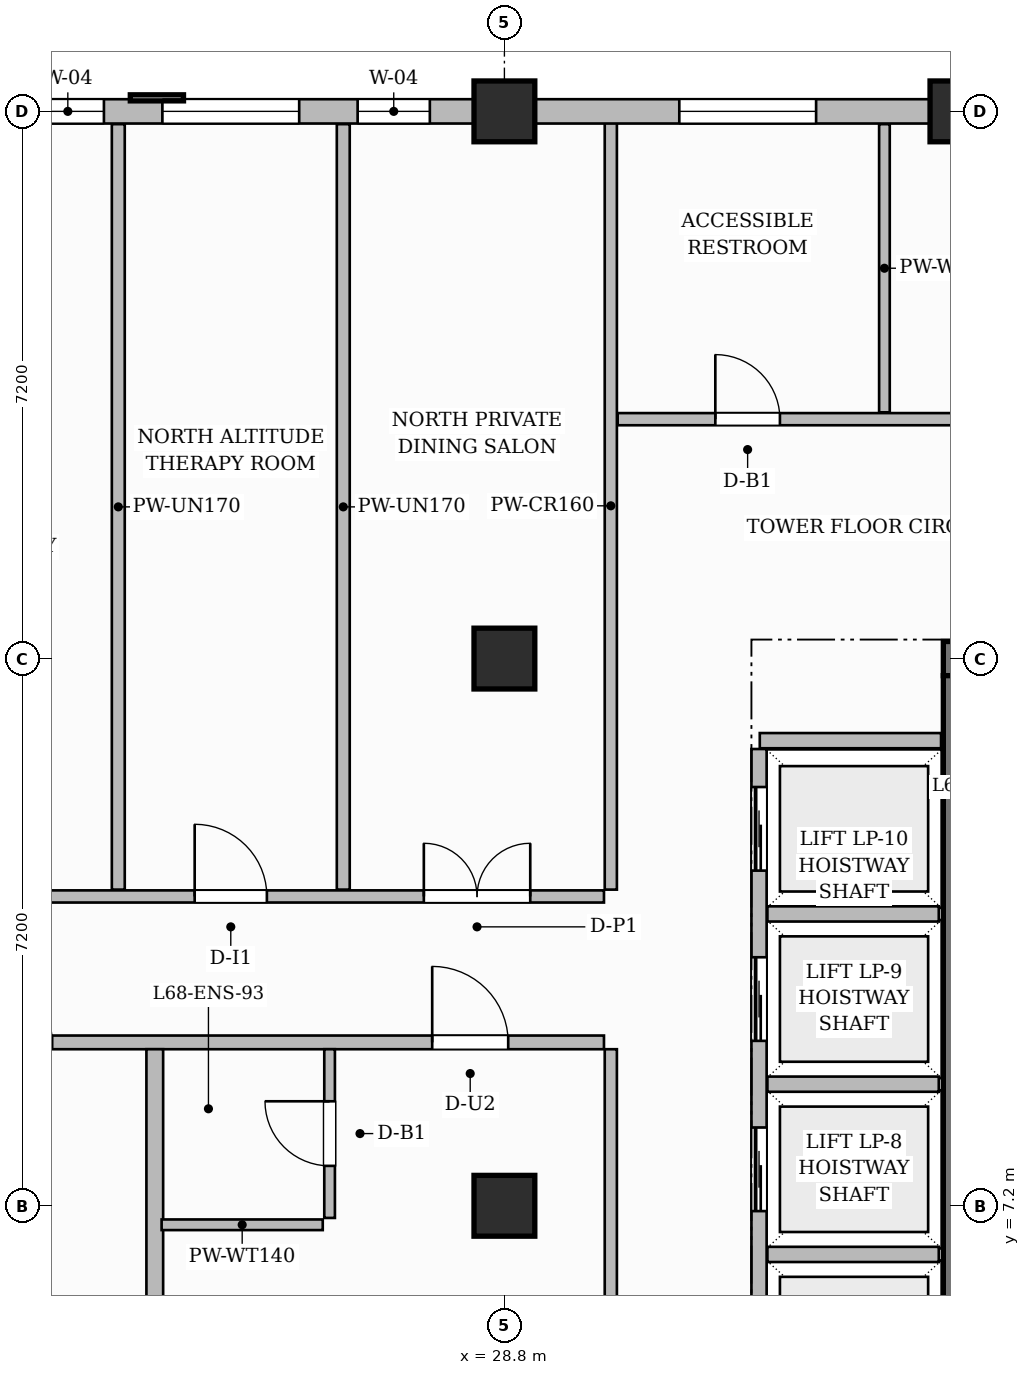
"""IFC4 building model, lengths in metres.
Left out: names, types, materials, properties, quantities, classifications, styles, units other than length and angle.
Written with IfcOpenShell. Run it as: python <this file> out.ifc"""

import sys

from ifc_helpers import new_model, si_unit, direction, frame, frame_2d, origin, origin_2d, place, context, subcontext, project, spatial, rectangle, extrude, source, transform, mapped, element, fill, save


model = new_model("IFC4")
c1 = context("Model", 3, precision=1e-05, world=origin(), true_north=direction((0.0, 1.0)))
c2 = subcontext(c1, "Body", "Model", "MODEL_VIEW")
j1 = project(units=[si_unit("LENGTHUNIT", "METRE"), si_unit("PLANEANGLEUNIT", "RADIAN")], contexts=[c1])
p1 = place(None, origin())
s1 = spatial("IfcSite", under=j1, at=p1, CompositionType="ELEMENT")
p2 = place(p1, origin())
s2 = spatial("IfcBuilding", under=s1, at=p2, CompositionType="ELEMENT")
p3 = place(p2, frame((0.0, 0.0, 271.2)))
s3 = spatial("IfcBuildingStorey", under=s2, at=p3, CompositionType="ELEMENT", Elevation=271.2)
p4 = place(p3, frame((34.575, 14.4, 0.0), z_axis=(0.0, 0.0, 1.0), x_axis=(1.0, 0.0, 0.0)))
e1 = element("IfcWall", 1, at=p4, inside=s3, PredefinedType="SHEAR", context=c2, shape_type="SweptSolid", body=[
    extrude(rectangle(XDim=15.45, YDim=0.45, at=frame_2d((7.725, 0.0))), origin(), (0.0, 0.0, 1.0), 3.85),
])
p5 = place(p4, frame((5.355, 0.0, 0.0)))
e2 = element("IfcOpeningElement", 2, at=p5, cuts=e1, PredefinedType="OPENING", context=c2, shape_type="SweptSolid", body=[
    extrude(rectangle(XDim=1.5, YDim=2.2, at=frame_2d((0.75, 1.1))), frame((0.0, 0.235, 0.0), z_axis=(0.0, -1.0, 0.0), x_axis=(1.0, 0.0, 0.0)), (0.0, 0.0, 1.0), 0.47),
])
p6 = place(p4, frame((1.57, 0.0, 0.0)))
e3 = element("IfcOpeningElement", 3, at=p6, cuts=e1, PredefinedType="OPENING", context=c2, shape_type="SweptSolid", body=[
    extrude(rectangle(XDim=1.05, YDim=2.15, at=frame_2d((0.525, 1.075))), frame((0.0, 0.235, 0.0), z_axis=(0.0, -1.0, 0.0), x_axis=(1.0, 0.0, 0.0)), (0.0, 0.0, 1.0), 0.47),
])
p7 = place(p4, frame((11.2, 0.0, 0.0)))
e4 = element("IfcOpeningElement", 4, at=p7, cuts=e1, PredefinedType="OPENING", context=c2, shape_type="SweptSolid", body=[
    extrude(rectangle(XDim=1.05, YDim=2.15, at=frame_2d((0.525, 1.075))), frame((0.0, 0.235, 0.0), z_axis=(0.0, -1.0, 0.0), x_axis=(1.0, 0.0, 0.0)), (0.0, 0.0, 1.0), 0.47),
])
p8 = place(p3, frame((34.8, 3.825, 0.0), z_axis=(0.0, 0.0, 1.0), x_axis=(0.0, 1.0, 0.0)))
e5 = element("IfcWall", 5, at=p8, inside=s3, PredefinedType="SHEAR", context=c2, shape_type="SweptSolid", body=[
    extrude(rectangle(XDim=10.35, YDim=0.45, at=frame_2d((5.175, 0.0))), origin(), (0.0, 0.0, 1.0), 3.85),
])
m1 = source(origin(), c2, "Body", "SweptSolid", [
    extrude(rectangle(XDim=0.8, YDim=0.8, at=origin_2d()), origin(), (0.0, 0.0, 1.0), 3.85),
])
for number, where, z_axis, x_axis in (
    (6, (28.8, 7.2, 0.0), (0.0, 0.0, 1.0), (1.0, 0.0, 0.0)),
    (7, (28.8, 14.4, 0.0), (0.0, 0.0, 1.0), (1.0, 0.0, 0.0)),
    (8, (28.8, 21.6, 0.0), (0.0, 0.0, 1.0), (1.0, 0.0, 0.0)),
    (9, (34.8, 21.6, 0.0), (0.0, 0.0, 1.0), (1.0, 0.0, 0.0)),
):
    element("IfcColumn", number, at=place(p3, frame(where, z_axis=z_axis, x_axis=x_axis)), inside=s3, PredefinedType="COLUMN", context=c2, shape_type="MappedRepresentation", body=[
        mapped(m1, transform((0.0, 0.0, 0.0), scale=1.0)),
    ])
p9 = place(p3, frame((32.16, 13.32, 0.0), z_axis=(0.0, 0.0, 1.0), x_axis=(1.0, 0.0, 0.0)))
e10 = element("IfcWall", 10, at=p9, inside=s3, PredefinedType="PARTITIONING", context=c2, shape_type="SweptSolid", body=[
    extrude(rectangle(XDim=2.385, YDim=0.2, at=frame_2d((1.192, 0.0))), origin(), (0.0, 0.0, 1.0), 3.6),
])
p10 = place(p3, frame((32.15, 4.39, 0.0), z_axis=(0.0, 0.0, 1.0), x_axis=(0.0, 1.0, 0.0)))
e11 = element("IfcWall", 11, at=p10, inside=s3, PredefinedType="PARTITIONING", context=c2, shape_type="SweptSolid", body=[
    extrude(rectangle(XDim=8.82, YDim=0.2, at=frame_2d((4.41, 0.0))), origin(), (0.0, 0.0, 1.0), 3.6),
])
p11 = place(p10, frame((0.5, 0.0, 0.0)))
e12 = element("IfcOpeningElement", 12, at=p11, cuts=e11, PredefinedType="OPENING", context=c2, shape_type="SweptSolid", body=[
    extrude(rectangle(XDim=1.1, YDim=2.2, at=frame_2d((0.55, 1.1))), frame((0.0, 0.11, 0.0), z_axis=(0.0, -1.0, 0.0), x_axis=(1.0, 0.0, 0.0)), (0.0, 0.0, 1.0), 0.22),
])
p12 = place(p10, frame((2.74, 0.0, 0.0)))
e13 = element("IfcOpeningElement", 13, at=p12, cuts=e11, PredefinedType="OPENING", context=c2, shape_type="SweptSolid", body=[
    extrude(rectangle(XDim=1.1, YDim=2.2, at=frame_2d((0.55, 1.1))), frame((0.0, 0.11, 0.0), z_axis=(0.0, -1.0, 0.0), x_axis=(1.0, 0.0, 0.0)), (0.0, 0.0, 1.0), 0.22),
])
p13 = place(p10, frame((4.98, 0.0, 0.0)))
e14 = element("IfcOpeningElement", 14, at=p13, cuts=e11, PredefinedType="OPENING", context=c2, shape_type="SweptSolid", body=[
    extrude(rectangle(XDim=1.1, YDim=2.2, at=frame_2d((0.55, 1.1))), frame((0.0, 0.11, 0.0), z_axis=(0.0, -1.0, 0.0), x_axis=(1.0, 0.0, 0.0)), (0.0, 0.0, 1.0), 0.22),
])
p14 = place(p10, frame((7.22, 0.0, 0.0)))
e15 = element("IfcOpeningElement", 15, at=p14, cuts=e11, PredefinedType="OPENING", context=c2, shape_type="SweptSolid", body=[
    extrude(rectangle(XDim=1.1, YDim=2.2, at=frame_2d((0.55, 1.1))), frame((0.0, 0.11, 0.0), z_axis=(0.0, -1.0, 0.0), x_axis=(1.0, 0.0, 0.0)), (0.0, 0.0, 1.0), 0.22),
])
for number, where, z_axis, x_axis in (
    (16, (32.26, 6.56, 0.0), (0.0, 0.0, 1.0), (1.0, 0.0, 0.0)),
    (17, (32.26, 8.8, 0.0), (0.0, 0.0, 1.0), (1.0, 0.0, 0.0)),
    (18, (32.26, 11.04, 0.0), (0.0, 0.0, 1.0), (1.0, 0.0, 0.0)),
):
    element("IfcWall", number, at=place(p3, frame(where, z_axis=z_axis, x_axis=x_axis)), inside=s3, PredefinedType="PARTITIONING", context=c2, shape_type="SweptSolid", body=[
        extrude(rectangle(XDim=2.255, YDim=0.2, at=frame_2d((1.127, 0.0))), origin(), (0.0, 0.0, 1.0), 3.6),
    ])
p15 = place(p3, frame((18.168, 9.35, 0.0), z_axis=(0.0, 0.0, 1.0), x_axis=(1.0, 0.0, 0.0)))
e19 = element("IfcWall", 19, at=p15, inside=s3, PredefinedType="PARTITIONING", context=c2, shape_type="SweptSolid", body=[
    extrude(rectangle(XDim=11.942, YDim=0.18, at=frame_2d((5.971, 0.0))), origin(), (0.0, 0.0, 1.0), 3.6),
])
p16 = place(p15, frame((3.632, 0.0, 0.0)))
e20 = element("IfcOpeningElement", 20, at=p16, cuts=e19, PredefinedType="OPENING", context=c2, shape_type="SweptSolid", body=[
    extrude(rectangle(XDim=1.05, YDim=2.25, at=frame_2d((0.525, 1.125))), frame((0.0, 0.1, 0.0), z_axis=(0.0, -1.0, 0.0), x_axis=(1.0, 0.0, 0.0)), (0.0, 0.0, 1.0), 0.2),
])
p17 = place(p15, frame((9.682, 0.0, 0.0)))
e21 = element("IfcOpeningElement", 21, at=p17, cuts=e19, PredefinedType="OPENING", context=c2, shape_type="SweptSolid", body=[
    extrude(rectangle(XDim=1.0, YDim=2.2, at=frame_2d((0.5, 1.1))), frame((0.0, 0.1, 0.0), z_axis=(0.0, -1.0, 0.0), x_axis=(1.0, 0.0, 0.0)), (0.0, 0.0, 1.0), 0.2),
])
p18 = place(p3, frame((18.168, 11.27, 0.0), z_axis=(0.0, 0.0, 1.0), x_axis=(1.0, 0.0, 0.0)))
e22 = element("IfcWall", 22, at=p18, inside=s3, PredefinedType="PARTITIONING", context=c2, shape_type="SweptSolid", body=[
    extrude(rectangle(XDim=11.942, YDim=0.16, at=frame_2d((5.971, 0.0))), origin(), (0.0, 0.0, 1.0), 3.6),
])
p19 = place(p18, frame((2.217, 0.0, 0.0)))
e23 = element("IfcOpeningElement", 23, at=p19, cuts=e22, PredefinedType="OPENING", context=c2, shape_type="SweptSolid", body=[
    extrude(rectangle(XDim=0.95, YDim=2.15, at=frame_2d((0.475, 1.075))), frame((0.0, 0.09, 0.0), z_axis=(0.0, -1.0, 0.0), x_axis=(1.0, 0.0, 0.0)), (0.0, 0.0, 1.0), 0.18),
])
p20 = place(p18, frame((6.557, 0.0, 0.0)))
e24 = element("IfcOpeningElement", 24, at=p20, cuts=e22, PredefinedType="OPENING", context=c2, shape_type="SweptSolid", body=[
    extrude(rectangle(XDim=0.95, YDim=2.15, at=frame_2d((0.475, 1.075))), frame((0.0, 0.09, 0.0), z_axis=(0.0, -1.0, 0.0), x_axis=(1.0, 0.0, 0.0)), (0.0, 0.0, 1.0), 0.18),
])
p21 = place(p18, frame((9.572, 0.0, 0.0)))
e25 = element("IfcOpeningElement", 25, at=p21, cuts=e22, PredefinedType="OPENING", context=c2, shape_type="SweptSolid", body=[
    extrude(rectangle(XDim=1.4, YDim=2.35, at=frame_2d((0.7, 1.175))), frame((0.0, 0.09, 0.0), z_axis=(0.0, -1.0, 0.0), x_axis=(1.0, 0.0, 0.0)), (0.0, 0.0, 1.0), 0.18),
])
p22 = place(p3, frame((30.2, 11.36, 0.0), z_axis=(0.0, 0.0, 1.0), x_axis=(0.0, 1.0, 0.0)))
e26 = element("IfcWall", 26, at=p22, inside=s3, PredefinedType="PARTITIONING", context=c2, shape_type="SweptSolid", body=[
    extrude(rectangle(XDim=10.1, YDim=0.16, at=frame_2d((5.05, 0.0))), origin(), (0.0, 0.0, 1.0), 3.6),
])
p23 = place(p3, frame((30.29, 17.55, 0.0), z_axis=(0.0, 0.0, 1.0), x_axis=(1.0, 0.0, 0.0)))
e27 = element("IfcWall", 27, at=p23, inside=s3, PredefinedType="PARTITIONING", context=c2, shape_type="SweptSolid", body=[
    extrude(rectangle(XDim=19.37, YDim=0.16, at=frame_2d((9.685, 0.0))), origin(), (0.0, 0.0, 1.0), 3.6),
])
p24 = place(p23, frame((1.285, 0.0, 0.0)))
e28 = element("IfcOpeningElement", 28, at=p24, cuts=e27, PredefinedType="OPENING", context=c2, shape_type="SweptSolid", body=[
    extrude(rectangle(XDim=0.85, YDim=2.1, at=frame_2d((0.425, 1.05))), frame((0.0, 0.09, 0.0), z_axis=(0.0, -1.0, 0.0), x_axis=(1.0, 0.0, 0.0)), (0.0, 0.0, 1.0), 0.18),
])
p25 = place(p23, frame((10.66, 0.0, 0.0)))
e29 = element("IfcOpeningElement", 29, at=p25, cuts=e27, PredefinedType="OPENING", context=c2, shape_type="SweptSolid", body=[
    extrude(rectangle(XDim=1.6, YDim=2.4, at=frame_2d((0.8, 1.2))), frame((0.0, 0.09, 0.0), z_axis=(0.0, -1.0, 0.0), x_axis=(1.0, 0.0, 0.0)), (0.0, 0.0, 1.0), 0.18),
])
p26 = place(p3, frame((30.2, 0.168, 0.0), z_axis=(0.0, 0.0, 1.0), x_axis=(0.0, 1.0, 0.0)))
e30 = element("IfcWall", 30, at=p26, inside=s3, PredefinedType="PARTITIONING", context=c2, shape_type="SweptSolid", body=[
    extrude(rectangle(XDim=9.092, YDim=0.16, at=frame_2d((4.546, 0.0))), origin(), (0.0, 0.0, 1.0), 3.6),
])
p27 = place(p26, frame((1.957, 0.0, 0.0)))
e31 = element("IfcOpeningElement", 31, at=p27, cuts=e30, PredefinedType="OPENING", context=c2, shape_type="SweptSolid", body=[
    extrude(rectangle(XDim=1.05, YDim=2.15, at=frame_2d((0.525, 1.075))), frame((0.0, 0.09, 0.0), z_axis=(0.0, -1.0, 0.0), x_axis=(1.0, 0.0, 0.0)), (0.0, 0.0, 1.0), 0.18),
])
p28 = place(p3, frame((33.8, 17.64, 0.0), z_axis=(0.0, 0.0, 1.0), x_axis=(0.0, 1.0, 0.0)))
e32 = element("IfcWall", 32, at=p28, inside=s3, PredefinedType="PARTITIONING", context=c2, shape_type="SweptSolid", body=[
    extrude(rectangle(XDim=3.792, YDim=0.14, at=frame_2d((1.896, 0.0))), origin(), (0.0, 0.0, 1.0), 3.6),
])
p29 = place(p3, frame((24.2, 0.168, 0.0), z_axis=(0.0, 0.0, 1.0), x_axis=(0.0, 1.0, 0.0)))
e33 = element("IfcWall", 33, at=p29, inside=s3, PredefinedType="PARTITIONING", context=c2, shape_type="SweptSolid", body=[
    extrude(rectangle(XDim=9.092, YDim=0.22, at=frame_2d((4.546, 0.0))), origin(), (0.0, 0.0, 1.0), 3.6),
])
p30 = place(p3, frame((26.5, 7.04, 0.0), z_axis=(0.0, 0.0, 1.0), x_axis=(0.0, 1.0, 0.0)))
e34 = element("IfcWall", 34, at=p30, inside=s3, PredefinedType="PARTITIONING", context=c2, shape_type="SweptSolid", body=[
    extrude(rectangle(XDim=2.22, YDim=0.14, at=frame_2d((1.11, 0.0))), origin(), (0.0, 0.0, 1.0), 3.6),
])
p31 = place(p30, frame((0.685, 0.0, 0.0)))
e35 = element("IfcOpeningElement", 35, at=p31, cuts=e34, PredefinedType="OPENING", context=c2, shape_type="SweptSolid", body=[
    extrude(rectangle(XDim=0.85, YDim=2.1, at=frame_2d((0.425, 1.05))), frame((0.0, 0.08, 0.0), z_axis=(0.0, -1.0, 0.0), x_axis=(1.0, 0.0, 0.0)), (0.0, 0.0, 1.0), 0.16),
])
p32 = place(p3, frame((24.29, 6.95, 0.0), z_axis=(0.0, 0.0, 1.0), x_axis=(1.0, 0.0, 0.0)))
e36 = element("IfcWall", 36, at=p32, inside=s3, PredefinedType="PARTITIONING", context=c2, shape_type="SweptSolid", body=[
    extrude(rectangle(XDim=2.12, YDim=0.14, at=frame_2d((1.06, 0.0))), origin(), (0.0, 0.0, 1.0), 3.185),
])
for number, where, z_axis, x_axis in (
    (37, (23.72, 11.36, 0.0), (0.0, 0.0, 1.0), (0.0, 1.0, 0.0)),
    (38, (26.68, 11.36, 0.0), (0.0, 0.0, 1.0), (0.0, 1.0, 0.0)),
):
    element("IfcWall", number, at=place(p3, frame(where, z_axis=z_axis, x_axis=x_axis)), inside=s3, PredefinedType="PARTITIONING", context=c2, shape_type="SweptSolid", body=[
        extrude(rectangle(XDim=10.072, YDim=0.17, at=frame_2d((5.036, 0.0))), origin(), (0.0, 0.0, 1.0), 3.6),
    ])
p33 = place(p3, frame((18.0, 21.6, 0.0), z_axis=(0.0, 0.0, 1.0), x_axis=(1.0, 0.0, 0.0)))
e39 = element("IfcWall", 39, at=p33, inside=s3, PredefinedType="SOLIDWALL", context=c2, shape_type="SweptSolid", body=[
    extrude(rectangle(XDim=31.8, YDim=0.32, at=frame_2d((15.9, 0.0))), origin(), (0.0, 0.0, 1.0), 3.185),
])
p34 = place(p33, frame((0.42, 0.0, 0.0)))
e40 = element("IfcOpeningElement", 40, at=p34, cuts=e39, PredefinedType="OPENING", context=c2, shape_type="SweptSolid", body=[
    extrude(rectangle(XDim=1.2, YDim=2.2, at=frame_2d((0.6, 1.1))), frame((0.0, 0.17, 0.0), z_axis=(0.0, -1.0, 0.0), x_axis=(1.0, 0.0, 0.0)), (0.0, 0.0, 1.0), 0.34),
])
p35 = place(p33, frame((4.581, 0.0, 0.8)))
e41 = element("IfcOpeningElement", 41, at=p35, cuts=e39, PredefinedType="OPENING", context=c2, shape_type="SweptSolid", body=[
    extrude(rectangle(XDim=0.95, YDim=1.75, at=frame_2d((0.475, 0.875))), frame((0.0, 0.17, 0.0), z_axis=(0.0, -1.0, 0.0), x_axis=(1.0, 0.0, 0.0)), (0.0, 0.0, 1.0), 0.34),
])
p36 = place(p33, frame((6.3, 0.0, 0.8)))
e42 = element("IfcOpeningElement", 42, at=p36, cuts=e39, PredefinedType="OPENING", context=c2, shape_type="SweptSolid", body=[
    extrude(rectangle(XDim=1.8, YDim=1.85, at=frame_2d((0.9, 0.925))), frame((0.0, 0.17, 0.0), z_axis=(0.0, -1.0, 0.0), x_axis=(1.0, 0.0, 0.0)), (0.0, 0.0, 1.0), 0.34),
])
p37 = place(p33, frame((8.869, 0.0, 0.8)))
e43 = element("IfcOpeningElement", 43, at=p37, cuts=e39, PredefinedType="OPENING", context=c2, shape_type="SweptSolid", body=[
    extrude(rectangle(XDim=0.95, YDim=1.75, at=frame_2d((0.475, 0.875))), frame((0.0, 0.17, 0.0), z_axis=(0.0, -1.0, 0.0), x_axis=(1.0, 0.0, 0.0)), (0.0, 0.0, 1.0), 0.34),
])
p38 = place(p33, frame((13.101, 0.0, 0.8)))
e44 = element("IfcOpeningElement", 44, at=p38, cuts=e39, PredefinedType="OPENING", context=c2, shape_type="SweptSolid", body=[
    extrude(rectangle(XDim=1.8, YDim=1.85, at=frame_2d((0.9, 0.925))), frame((0.0, 0.17, 0.0), z_axis=(0.0, -1.0, 0.0), x_axis=(1.0, 0.0, 0.0)), (0.0, 0.0, 1.0), 0.34),
])
p39 = place(p33, frame((18.125, 0.0, 0.8)))
e45 = element("IfcOpeningElement", 45, at=p39, cuts=e39, PredefinedType="OPENING", context=c2, shape_type="SweptSolid", body=[
    extrude(rectangle(XDim=1.8, YDim=1.85, at=frame_2d((0.9, 0.925))), frame((0.0, 0.17, 0.0), z_axis=(0.0, -1.0, 0.0), x_axis=(1.0, 0.0, 0.0)), (0.0, 0.0, 1.0), 0.34),
])
p40 = place(p33, frame((20.875, 0.0, 0.8)))
e46 = element("IfcOpeningElement", 46, at=p40, cuts=e39, PredefinedType="OPENING", context=c2, shape_type="SweptSolid", body=[
    extrude(rectangle(XDim=1.8, YDim=1.85, at=frame_2d((0.9, 0.925))), frame((0.0, 0.17, 0.0), z_axis=(0.0, -1.0, 0.0), x_axis=(1.0, 0.0, 0.0)), (0.0, 0.0, 1.0), 0.34),
])
p41 = place(p33, frame((25.475, 0.0, 0.8)))
e47 = element("IfcOpeningElement", 47, at=p41, cuts=e39, PredefinedType="OPENING", context=c2, shape_type="SweptSolid", body=[
    extrude(rectangle(XDim=1.8, YDim=1.85, at=frame_2d((0.9, 0.925))), frame((0.0, 0.17, 0.0), z_axis=(0.0, -1.0, 0.0), x_axis=(1.0, 0.0, 0.0)), (0.0, 0.0, 1.0), 0.34),
])
p42 = place(p33, frame((28.525, 0.0, 0.8)))
e48 = element("IfcOpeningElement", 48, at=p42, cuts=e39, PredefinedType="OPENING", context=c2, shape_type="SweptSolid", body=[
    extrude(rectangle(XDim=1.8, YDim=1.85, at=frame_2d((0.9, 0.925))), frame((0.0, 0.17, 0.0), z_axis=(0.0, -1.0, 0.0), x_axis=(1.0, 0.0, 0.0)), (0.0, 0.0, 1.0), 0.34),
])
m2 = source(origin(), c2, "Body", "SweptSolid", [
    extrude(rectangle(XDim=0.85, YDim=2.1, at=frame_2d((0.425, 1.05))), frame((0.0, 0.025, 0.0), z_axis=(0.0, -1.0, 0.0), x_axis=(1.0, 0.0, 0.0)), (0.0, 0.0, 1.0), 0.05),
])
p43 = place(p24, origin())
e49 = element("IfcDoor", 49, at=p43, inside=s3, OperationType="SINGLE_SWING_LEFT", PredefinedType="DOOR", context=c2, shape_type="MappedRepresentation", body=[
    mapped(m2, transform((0.0, 0.0, 0.0), scale=1.0)),
])
fill(e28, e49)
p44 = place(p31, origin())
e50 = element("IfcDoor", 50, at=p44, inside=s3, OperationType="SINGLE_SWING_RIGHT", PredefinedType="DOOR", context=c2, shape_type="MappedRepresentation", body=[
    mapped(m2, transform((0.0, 0.0, 0.0), scale=1.0)),
])
fill(e35, e50)
m3 = source(origin(), c2, "Body", "SweptSolid", [
    extrude(rectangle(XDim=1.0, YDim=2.2, at=frame_2d((0.5, 1.1))), frame((0.0, 0.025, 0.0), z_axis=(0.0, -1.0, 0.0), x_axis=(1.0, 0.0, 0.0)), (0.0, 0.0, 1.0), 0.05),
])
p45 = place(p17, origin())
e51 = element("IfcDoor", 51, at=p45, inside=s3, OperationType="SINGLE_SWING_LEFT", PredefinedType="DOOR", context=c2, shape_type="MappedRepresentation", body=[
    mapped(m3, transform((0.0, 0.0, 0.0), scale=1.0)),
])
fill(e21, e51)
m4 = source(origin(), c2, "Body", "SweptSolid", [
    extrude(rectangle(XDim=0.95, YDim=2.15, at=frame_2d((0.475, 1.075))), frame((0.0, 0.025, 0.0), z_axis=(0.0, -1.0, 0.0), x_axis=(1.0, 0.0, 0.0)), (0.0, 0.0, 1.0), 0.05),
])
p46 = place(p20, origin())
e52 = element("IfcDoor", 52, at=p46, inside=s3, OperationType="SINGLE_SWING_LEFT", PredefinedType="DOOR", context=c2, shape_type="MappedRepresentation", body=[
    mapped(m4, transform((0.0, 0.0, 0.0), scale=1.0)),
])
fill(e24, e52)
m5 = source(origin(), c2, "Body", "SweptSolid", [
    extrude(rectangle(XDim=1.4, YDim=2.35, at=frame_2d((0.7, 1.175))), frame((0.0, 0.025, 0.0), z_axis=(0.0, -1.0, 0.0), x_axis=(1.0, 0.0, 0.0)), (0.0, 0.0, 1.0), 0.05),
])
p47 = place(p21, origin())
e53 = element("IfcDoor", 53, at=p47, inside=s3, OperationType="DOUBLE_DOOR_SINGLE_SWING", PredefinedType="DOOR", context=c2, shape_type="MappedRepresentation", body=[
    mapped(m5, transform((0.0, 0.0, 0.0), scale=1.0)),
])
fill(e25, e53)
m6 = source(origin(), c2, "Body", "SweptSolid", [
    extrude(rectangle(XDim=1.1, YDim=2.2, at=frame_2d((0.55, 1.1))), frame((0.0, 0.025, 0.0), z_axis=(0.0, -1.0, 0.0), x_axis=(1.0, 0.0, 0.0)), (0.0, 0.0, 1.0), 0.05),
])
p48 = place(p12, origin())
e54 = element("IfcDoor", 54, at=p48, inside=s3, OperationType="SLIDING_TO_LEFT", PredefinedType="DOOR", context=c2, shape_type="MappedRepresentation", body=[
    mapped(m6, transform((0.0, 0.0, 0.0), scale=1.0)),
])
fill(e13, e54)
p49 = place(p13, origin())
e55 = element("IfcDoor", 55, at=p49, inside=s3, OperationType="SLIDING_TO_LEFT", PredefinedType="DOOR", context=c2, shape_type="MappedRepresentation", body=[
    mapped(m6, transform((0.0, 0.0, 0.0), scale=1.0)),
])
fill(e14, e55)
p50 = place(p14, origin())
e56 = element("IfcDoor", 56, at=p50, inside=s3, OperationType="SLIDING_TO_LEFT", PredefinedType="DOOR", context=c2, shape_type="MappedRepresentation", body=[
    mapped(m6, transform((0.0, 0.0, 0.0), scale=1.0)),
])
fill(e15, e56)
m7 = source(origin(), c2, "Body", "SweptSolid", [
    extrude(rectangle(XDim=0.95, YDim=1.75, at=frame_2d((0.475, 0.875))), frame((0.0, 0.03, 0.0), z_axis=(0.0, -1.0, 0.0), x_axis=(1.0, 0.0, 0.0)), (0.0, 0.0, 1.0), 0.06),
])
p51 = place(p35, origin())
e57 = element("IfcWindow", 57, at=p51, inside=s3, PartitioningType="SINGLE_PANEL", PredefinedType="WINDOW", context=c2, shape_type="MappedRepresentation", body=[
    mapped(m7, transform((0.0, 0.0, 0.0), scale=1.0)),
])
fill(e41, e57)
m8 = source(origin(), c2, "Body", "SweptSolid", [
    extrude(rectangle(XDim=1.8, YDim=1.85, at=frame_2d((0.9, 0.925))), frame((0.0, 0.03, 0.0), z_axis=(0.0, -1.0, 0.0), x_axis=(1.0, 0.0, 0.0)), (0.0, 0.0, 1.0), 0.06),
])
p52 = place(p36, origin())
e58 = element("IfcWindow", 58, at=p52, inside=s3, PartitioningType="DOUBLE_PANEL_VERTICAL", PredefinedType="WINDOW", context=c2, shape_type="MappedRepresentation", body=[
    mapped(m8, transform((0.0, 0.0, 0.0), scale=1.0)),
])
fill(e42, e58)
p53 = place(p37, origin())
e59 = element("IfcWindow", 59, at=p53, inside=s3, PartitioningType="SINGLE_PANEL", PredefinedType="WINDOW", context=c2, shape_type="MappedRepresentation", body=[
    mapped(m7, transform((0.0, 0.0, 0.0), scale=1.0)),
])
fill(e43, e59)
p54 = place(p38, origin())
e60 = element("IfcWindow", 60, at=p54, inside=s3, PartitioningType="DOUBLE_PANEL_VERTICAL", PredefinedType="WINDOW", context=c2, shape_type="MappedRepresentation", body=[
    mapped(m8, transform((0.0, 0.0, 0.0), scale=1.0)),
])
fill(e44, e60)
save(model, sys.argv[1])
